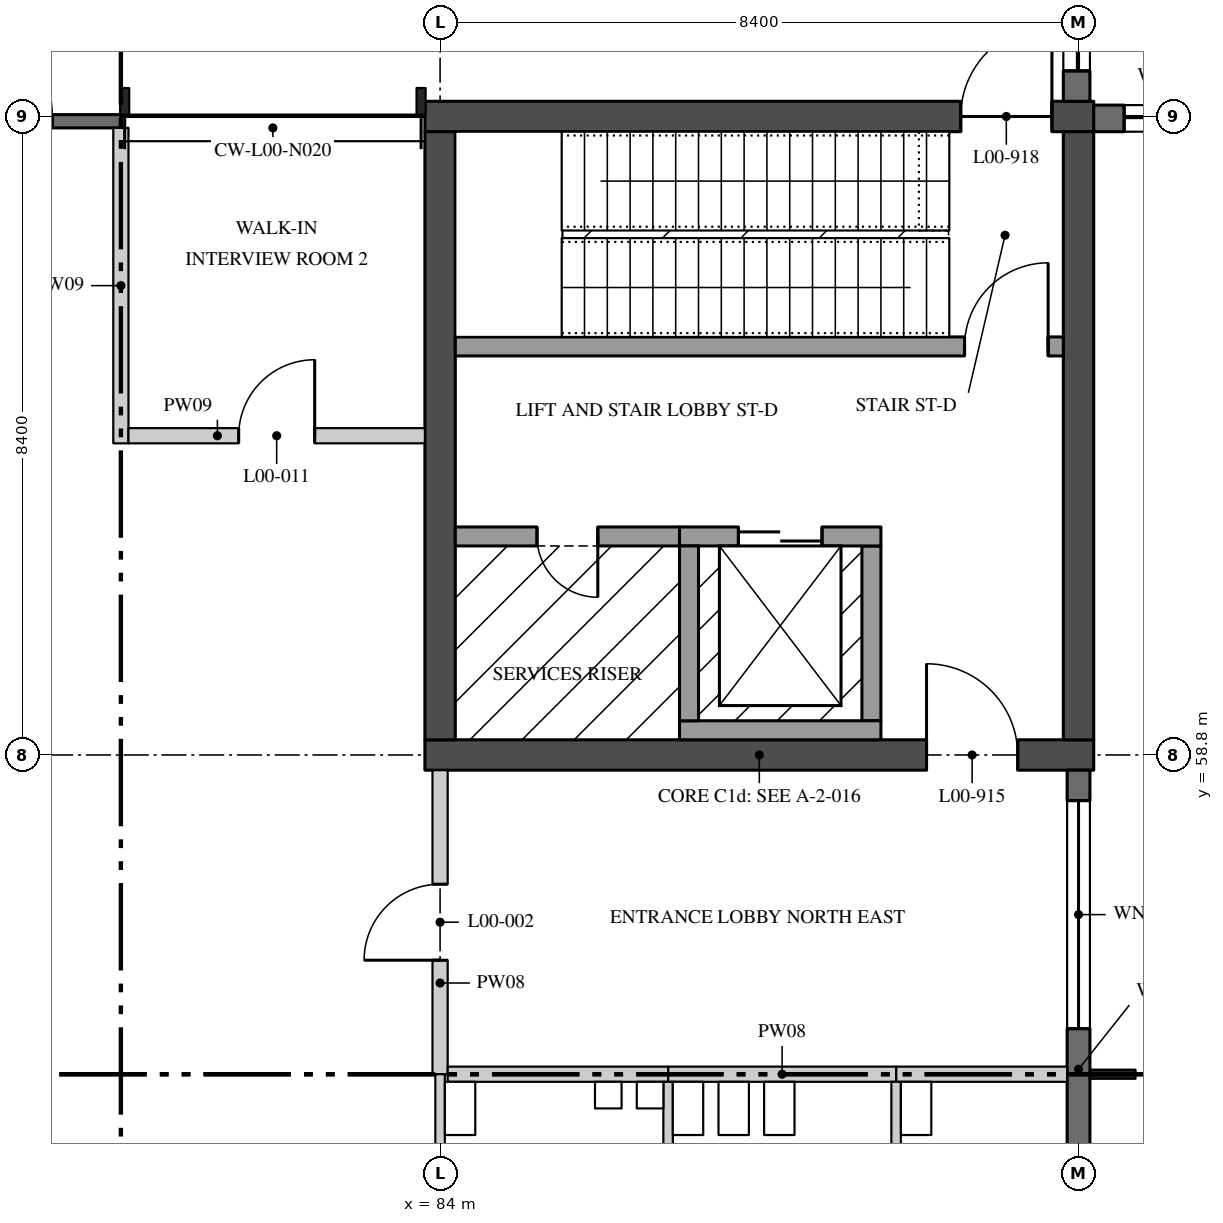
"""IFC4 building model, lengths in metres.
Left out: names, types, materials, properties, quantities, classifications, styles, units other than length and angle.
Written with IfcOpenShell. Run it as: python <this file> out.ifc"""

import sys

from ifc_helpers import new_model, si_unit, direction, frame, frame_2d, origin, place, context, subcontext, project, spatial, rectangle, extrude, element, fill, save


model = new_model("IFC4")
c1 = context("Model", 3, precision=1e-05, world=origin(), true_north=direction((0.0, 1.0)))
c2 = subcontext(c1, "Body", "Model", "MODEL_VIEW")
j1 = project(units=[si_unit("LENGTHUNIT", "METRE"), si_unit("PLANEANGLEUNIT", "RADIAN")], contexts=[c1])
p1 = place(None, origin())
s1 = spatial("IfcSite", under=j1, at=p1, CompositionType="ELEMENT")
p2 = place(p1, origin())
s2 = spatial("IfcBuilding", under=s1, at=p2, CompositionType="ELEMENT")
p3 = place(p2, origin())
s3 = spatial("IfcBuildingStorey", under=s2, at=p3, CompositionType="ELEMENT", Elevation=0.0)
p4 = place(p3, frame((83.8, 58.8, 0.0), z_axis=(0.0, 0.0, 1.0), x_axis=(1.0, 0.0, 0.0)))
e1 = element("IfcWall", 1, at=p4, inside=s3, PredefinedType="SHEAR", context=c2, shape_type="SweptSolid", body=[
    extrude(rectangle(XDim=8.8, YDim=0.4, at=frame_2d((4.4, 0.0))), origin(), (0.0, 0.0, 1.0), 5.05),
])
p5 = place(p4, frame((6.6, 0.0, 0.0)))
e2 = element("IfcOpeningElement", 2, at=p5, cuts=e1, PredefinedType="OPENING", context=c2, shape_type="SweptSolid", body=[
    extrude(rectangle(XDim=1.2, YDim=2.1, at=frame_2d((0.6, 1.05))), frame((0.0, 0.21, 0.0), z_axis=(0.0, -1.0, 0.0), x_axis=(1.0, 0.0, 0.0)), (0.0, 0.0, 1.0), 0.42),
])
p6 = place(p3, frame((83.8, 67.2, 0.0), z_axis=(0.0, 0.0, 1.0), x_axis=(1.0, 0.0, 0.0)))
e3 = element("IfcWall", 3, at=p6, inside=s3, PredefinedType="SHEAR", context=c2, shape_type="SweptSolid", body=[
    extrude(rectangle(XDim=8.8, YDim=0.4, at=frame_2d((4.4, 0.0))), origin(), (0.0, 0.0, 1.0), 5.05),
])
p7 = place(p6, frame((7.05, 0.0, 0.0)))
e4 = element("IfcOpeningElement", 4, at=p7, cuts=e3, PredefinedType="OPENING", context=c2, shape_type="SweptSolid", body=[
    extrude(rectangle(XDim=1.2, YDim=2.1, at=frame_2d((0.6, 1.05))), frame((0.0, 0.21, 0.0), z_axis=(0.0, -1.0, 0.0), x_axis=(1.0, 0.0, 0.0)), (0.0, 0.0, 1.0), 0.42),
])
for number, where, z_axis, x_axis in (
    (5, (84.0, 59.0, 0.0), (0.0, 0.0, 1.0), (0.0, 1.0, 0.0)),
    (6, (92.4, 59.0, 0.0), (0.0, 0.0, 1.0), (0.0, 1.0, 0.0)),
):
    element("IfcWall", number, at=place(p3, frame(where, z_axis=z_axis, x_axis=x_axis)), inside=s3, PredefinedType="SHEAR", context=c2, shape_type="SweptSolid", body=[
        extrude(rectangle(XDim=8.0, YDim=0.4, at=frame_2d((4.0, 0.0))), origin(), (0.0, 0.0, 1.0), 5.05),
    ])
p8 = place(p3, frame((92.2, 64.175, 0.0), z_axis=(0.0, 0.0, 1.0), x_axis=(-1.0, 0.0, 0.0)))
e7 = element("IfcWall", 7, at=p8, inside=s3, PredefinedType="SOLIDWALL", context=c2, shape_type="SweptSolid", body=[
    extrude(rectangle(XDim=8.0, YDim=0.25, at=frame_2d((4.0, 0.0))), origin(), (0.0, 0.0, 1.0), 5.05),
])
p9 = place(p8, frame((0.2, 0.0, 0.0)))
e8 = element("IfcOpeningElement", 8, at=p9, cuts=e7, PredefinedType="OPENING", context=c2, shape_type="SweptSolid", body=[
    extrude(rectangle(XDim=1.1, YDim=2.1, at=frame_2d((0.55, 1.05))), frame((0.0, 0.135, 0.0), z_axis=(0.0, -1.0, 0.0), x_axis=(1.0, 0.0, 0.0)), (0.0, 0.0, 1.0), 0.27),
])
p10 = place(p3, frame((87.15, 61.675, 0.0), z_axis=(0.0, 0.0, 1.0), x_axis=(-1.0, 0.0, 0.0)))
e9 = element("IfcWall", 9, at=p10, inside=s3, PredefinedType="SOLIDWALL", context=c2, shape_type="SweptSolid", body=[
    extrude(rectangle(XDim=2.95, YDim=0.25, at=frame_2d((1.475, 0.0))), origin(), (0.0, 0.0, 1.0), 5.05),
])
p11 = place(p10, frame((1.075, 0.0, 0.0)))
e10 = element("IfcOpeningElement", 10, at=p11, cuts=e9, PredefinedType="OPENING", context=c2, shape_type="SweptSolid", body=[
    extrude(rectangle(XDim=0.8, YDim=2.1, at=frame_2d((0.4, 1.05))), frame((0.0, 0.135, 0.0), z_axis=(0.0, -1.0, 0.0), x_axis=(1.0, 0.0, 0.0)), (0.0, 0.0, 1.0), 0.27),
])
p12 = place(p3, frame((89.675, 59.25, 0.0), z_axis=(0.0, 0.0, 1.0), x_axis=(0.0, 1.0, 0.0)))
e11 = element("IfcWall", 11, at=p12, inside=s3, PredefinedType="SOLIDWALL", context=c2, shape_type="SweptSolid", body=[
    extrude(rectangle(XDim=2.3, YDim=0.25, at=frame_2d((1.15, 0.0))), origin(), (0.0, 0.0, 1.0), 5.05),
])
p13 = place(p3, frame((87.15, 61.675, 0.0), z_axis=(0.0, 0.0, 1.0), x_axis=(1.0, 0.0, 0.0)))
e12 = element("IfcWall", 12, at=p13, inside=s3, PredefinedType="SOLIDWALL", context=c2, shape_type="SweptSolid", body=[
    extrude(rectangle(XDim=2.65, YDim=0.25, at=frame_2d((1.325, 0.0))), origin(), (0.0, 0.0, 1.0), 5.05),
])
p14 = place(p13, frame((0.775, 0.0, 0.0)))
e13 = element("IfcOpeningElement", 13, at=p14, cuts=e12, PredefinedType="OPENING", context=c2, shape_type="SweptSolid", body=[
    extrude(rectangle(XDim=1.1, YDim=2.1, at=frame_2d((0.55, 1.05))), frame((0.0, 0.135, 0.0), z_axis=(0.0, -1.0, 0.0), x_axis=(1.0, 0.0, 0.0)), (0.0, 0.0, 1.0), 0.27),
])
p15 = place(p3, frame((87.15, 59.125, 0.0), z_axis=(0.0, 0.0, 1.0), x_axis=(1.0, 0.0, 0.0)))
e14 = element("IfcWall", 14, at=p15, inside=s3, PredefinedType="SOLIDWALL", context=c2, shape_type="SweptSolid", body=[
    extrude(rectangle(XDim=2.65, YDim=0.25, at=frame_2d((1.325, 0.0))), origin(), (0.0, 0.0, 1.0), 5.05),
])
p16 = place(p3, frame((87.275, 59.25, 0.0), z_axis=(0.0, 0.0, 1.0), x_axis=(0.0, 1.0, 0.0)))
e15 = element("IfcWall", 15, at=p16, inside=s3, PredefinedType="SOLIDWALL", context=c2, shape_type="SweptSolid", body=[
    extrude(rectangle(XDim=2.3, YDim=0.25, at=frame_2d((1.15, 0.0))), origin(), (0.0, 0.0, 1.0), 5.05),
])
p17 = place(p3, frame((84.0, 54.6, 0.0), z_axis=(0.0, 0.0, 1.0), x_axis=(0.0, 1.0, 0.0)))
e16 = element("IfcWall", 16, at=p17, inside=s3, PredefinedType="PARTITIONING", context=c2, shape_type="SweptSolid", body=[
    extrude(rectangle(XDim=4.0, YDim=0.2, at=frame_2d((2.0, 0.0))), origin(), (0.0, 0.0, 1.0), 18.77),
])
p18 = place(p17, frame((1.5, 0.0, 0.0)))
e17 = element("IfcOpeningElement", 17, at=p18, cuts=e16, PredefinedType="OPENING", context=c2, shape_type="SweptSolid", body=[
    extrude(rectangle(XDim=1.0, YDim=2.4, at=frame_2d((0.5, 1.2))), frame((0.0, 0.11, 0.0), z_axis=(0.0, -1.0, 0.0), x_axis=(1.0, 0.0, 0.0)), (0.0, 0.0, 1.0), 0.22),
])
p19 = place(p3, frame((90.0, 54.6, 0.0), z_axis=(0.0, 0.0, 1.0), x_axis=(1.0, 0.0, 0.0)))
e18 = element("IfcWall", 18, at=p19, inside=s3, PredefinedType="PARTITIONING", context=c2, shape_type="SweptSolid", body=[
    extrude(rectangle(XDim=2.25, YDim=0.2, at=frame_2d((1.125, 0.0))), origin(), (0.0, 0.0, 1.0), 5.05),
])
p20 = place(p3, frame((87.0, 54.6, 0.0), z_axis=(0.0, 0.0, 1.0), x_axis=(1.0, 0.0, 0.0)))
e19 = element("IfcWall", 19, at=p20, inside=s3, PredefinedType="PARTITIONING", context=c2, shape_type="SweptSolid", body=[
    extrude(rectangle(XDim=3.0, YDim=0.2, at=frame_2d((1.5, 0.0))), origin(), (0.0, 0.0, 1.0), 5.05),
])
p21 = place(p3, frame((84.1, 54.6, 0.0), z_axis=(0.0, 0.0, 1.0), x_axis=(1.0, 0.0, 0.0)))
e20 = element("IfcWall", 20, at=p21, inside=s3, PredefinedType="PARTITIONING", context=c2, shape_type="SweptSolid", body=[
    extrude(rectangle(XDim=2.9, YDim=0.2, at=frame_2d((1.45, 0.0))), origin(), (0.0, 0.0, 1.0), 5.05),
])
p22 = place(p3, frame((84.0, 50.85, 0.0), z_axis=(0.0, 0.0, 1.0), x_axis=(0.0, 1.0, 0.0)))
e21 = element("IfcWall", 21, at=p22, inside=s3, PredefinedType="PARTITIONING", context=c2, shape_type="SweptSolid", body=[
    extrude(rectangle(XDim=3.75, YDim=0.125, at=frame_2d((1.875, 0.0))), origin(), (0.0, 0.0, 1.0), 18.77),
])
p23 = place(p3, frame((79.8, 62.9, 0.0), z_axis=(0.0, 0.0, 1.0), x_axis=(0.0, 1.0, 0.0)))
e22 = element("IfcWall", 22, at=p23, inside=s3, PredefinedType="PARTITIONING", context=c2, shape_type="SweptSolid", body=[
    extrude(rectangle(XDim=4.15, YDim=0.2, at=frame_2d((2.075, 0.0))), origin(), (0.0, 0.0, 1.0), 18.591),
])
p24 = place(p3, frame((79.9, 63.0, 0.0), z_axis=(0.0, 0.0, 1.0), x_axis=(1.0, 0.0, 0.0)))
e23 = element("IfcWall", 23, at=p24, inside=s3, PredefinedType="PARTITIONING", context=c2, shape_type="SweptSolid", body=[
    extrude(rectangle(XDim=3.9, YDim=0.2, at=frame_2d((1.95, 0.0))), origin(), (0.0, 0.0, 1.0), 18.77),
])
p25 = place(p24, frame((1.45, 0.0, 0.0)))
e24 = element("IfcOpeningElement", 24, at=p25, cuts=e23, PredefinedType="OPENING", context=c2, shape_type="SweptSolid", body=[
    extrude(rectangle(XDim=1.0, YDim=2.1, at=frame_2d((0.5, 1.05))), frame((0.0, 0.11, 0.0), z_axis=(0.0, -1.0, 0.0), x_axis=(1.0, 0.0, 0.0)), (0.0, 0.0, 1.0), 0.22),
])
for number, where, z_axis, x_axis in (
    (25, (90.0, 48.663, 0.0), (0.0, 0.0, 1.0), (0.0, 1.0, 0.0)),
    (26, (87.0, 48.663, 0.0), (0.0, 0.0, 1.0), (0.0, 1.0, 0.0)),
):
    element("IfcWall", number, at=place(p3, frame(where, z_axis=z_axis, x_axis=x_axis)), inside=s3, PredefinedType="PARTITIONING", context=c2, shape_type="SweptSolid", body=[
        extrude(rectangle(XDim=5.837, YDim=0.125, at=frame_2d((2.918, 0.0))), origin(), (0.0, 0.0, 1.0), 5.05),
    ])
p26 = place(p3, frame((92.375, 75.4, 0.0), z_axis=(0.0, 0.0, 1.0), x_axis=(0.0, -1.0, 0.0)))
e27 = element("IfcWall", 27, at=p26, inside=s3, PredefinedType="SOLIDWALL", context=c2, shape_type="SweptSolid", body=[
    extrude(rectangle(XDim=8.0, YDim=0.35, at=frame_2d((4.0, 0.0))), origin(), (0.0, 0.0, 1.0), 5.05),
])
p27 = place(p26, frame((6.7, 0.0, 1.5)))
e28 = element("IfcOpeningElement", 28, at=p27, cuts=e27, PredefinedType="OPENING", context=c2, shape_type="SweptSolid", body=[
    extrude(rectangle(XDim=0.9, YDim=1.2, at=frame_2d((0.45, 0.6))), frame((0.0, 0.185, 0.0), z_axis=(0.0, -1.0, 0.0), x_axis=(1.0, 0.0, 0.0)), (0.0, 0.0, 1.0), 0.37),
])
p28 = place(p3, frame((92.6, 67.175, 0.0), z_axis=(0.0, 0.0, 1.0), x_axis=(1.0, 0.0, 0.0)))
e29 = element("IfcWall", 29, at=p28, inside=s3, PredefinedType="SOLIDWALL", context=c2, shape_type="SweptSolid", body=[
    extrude(rectangle(XDim=7.77, YDim=0.35, at=frame_2d((3.885, 0.0))), origin(), (0.0, 0.0, 1.0), 5.05),
])
p29 = place(p28, frame((0.4, 0.0, 1.5)))
e30 = element("IfcOpeningElement", 30, at=p29, cuts=e29, PredefinedType="OPENING", context=c2, shape_type="SweptSolid", body=[
    extrude(rectangle(XDim=0.9, YDim=1.2, at=frame_2d((0.45, 0.6))), frame((0.0, 0.185, 0.0), z_axis=(0.0, -1.0, 0.0), x_axis=(1.0, 0.0, 0.0)), (0.0, 0.0, 1.0), 0.37),
])
p30 = place(p28, frame((2.5, 0.0, 1.5)))
e31 = element("IfcOpeningElement", 31, at=p30, cuts=e29, PredefinedType="OPENING", context=c2, shape_type="SweptSolid", body=[
    extrude(rectangle(XDim=0.9, YDim=1.2, at=frame_2d((0.45, 0.6))), frame((0.0, 0.185, 0.0), z_axis=(0.0, -1.0, 0.0), x_axis=(1.0, 0.0, 0.0)), (0.0, 0.0, 1.0), 0.37),
])
p31 = place(p28, frame((4.6, 0.0, 1.5)))
e32 = element("IfcOpeningElement", 32, at=p31, cuts=e29, PredefinedType="OPENING", context=c2, shape_type="SweptSolid", body=[
    extrude(rectangle(XDim=0.9, YDim=1.2, at=frame_2d((0.45, 0.6))), frame((0.0, 0.185, 0.0), z_axis=(0.0, -1.0, 0.0), x_axis=(1.0, 0.0, 0.0)), (0.0, 0.0, 1.0), 0.37),
])
p32 = place(p3, frame((79.8, 67.137, 0.0), z_axis=(0.0, 0.0, 1.0), x_axis=(-1.0, 0.0, 0.0)))
e33 = element("IfcWall", 33, at=p32, inside=s3, PredefinedType="SOLIDWALL", context=c2, shape_type="SweptSolid", body=[
    extrude(rectangle(XDim=3.87, YDim=0.175, at=frame_2d((1.935, 0.0))), origin(), (0.0, 0.0, 1.0), 5.4),
])
p33 = place(p32, frame((0.9, 0.0, 0.0)))
e34 = element("IfcOpeningElement", 34, at=p33, cuts=e33, PredefinedType="OPENING", context=c2, shape_type="SweptSolid", body=[
    extrude(rectangle(XDim=2.4, YDim=2.7, at=frame_2d((1.2, 1.35))), frame((0.0, 0.098, 0.0), z_axis=(0.0, -1.0, 0.0), x_axis=(1.0, 0.0, 0.0)), (0.0, 0.0, 1.0), 0.195),
])
p34 = place(p3, frame((92.4, 50.73, 0.0), z_axis=(0.0, 0.0, 1.0), x_axis=(0.0, 1.0, 0.0)))
e35 = element("IfcWall", 35, at=p34, inside=s3, PredefinedType="SOLIDWALL", context=c2, shape_type="SweptSolid", body=[
    extrude(rectangle(XDim=7.87, YDim=0.3, at=frame_2d((3.935, 0.0))), origin(), (0.0, 0.0, 1.0), 5.05),
])
p35 = place(p34, frame((1.32, 0.0, 1.5)))
e36 = element("IfcOpeningElement", 36, at=p35, cuts=e35, PredefinedType="OPENING", context=c2, shape_type="SweptSolid", body=[
    extrude(rectangle(XDim=0.9, YDim=1.2, at=frame_2d((0.45, 0.6))), frame((0.0, 0.16, 0.0), z_axis=(0.0, -1.0, 0.0), x_axis=(1.0, 0.0, 0.0)), (0.0, 0.0, 1.0), 0.32),
])
p36 = place(p34, frame((4.47, 0.0, 2.85)))
e37 = element("IfcOpeningElement", 37, at=p36, cuts=e35, PredefinedType="OPENING", context=c2, shape_type="SweptSolid", body=[
    extrude(rectangle(XDim=3.0, YDim=1.2, at=frame_2d((1.5, 0.6))), frame((0.0, 0.16, 0.0), z_axis=(0.0, -1.0, 0.0), x_axis=(1.0, 0.0, 0.0)), (0.0, 0.0, 1.0), 0.32),
])
p37 = place(p5, origin())
e38 = element("IfcDoor", 38, at=p37, inside=s3, OperationType="SINGLE_SWING_RIGHT", PredefinedType="DOOR", context=c2, shape_type="SweptSolid", body=[
    extrude(rectangle(XDim=1.2, YDim=2.1, at=frame_2d((0.6, 1.05))), frame((0.0, 0.035, 0.0), z_axis=(0.0, -1.0, 0.0), x_axis=(1.0, 0.0, 0.0)), (0.0, 0.0, 1.0), 0.07),
])
fill(e2, e38)
p38 = place(p11, origin())
e39 = element("IfcDoor", 39, at=p38, inside=s3, OperationType="SINGLE_SWING_RIGHT", PredefinedType="DOOR", context=c2, shape_type="SweptSolid", body=[
    extrude(rectangle(XDim=0.8, YDim=2.1, at=frame_2d((0.4, 1.05))), frame((0.0, 0.035, 0.0), z_axis=(0.0, -1.0, 0.0), x_axis=(1.0, 0.0, 0.0)), (0.0, 0.0, 1.0), 0.07),
])
fill(e10, e39)
p39 = place(p9, frame((1.1, 0.0, 0.0), z_axis=(0.0, 0.0, 1.0), x_axis=(-1.0, 0.0, 0.0)))
e40 = element("IfcDoor", 40, at=p39, inside=s3, OperationType="SINGLE_SWING_LEFT", PredefinedType="DOOR", context=c2, shape_type="SweptSolid", body=[
    extrude(rectangle(XDim=1.1, YDim=2.1, at=frame_2d((0.55, 1.05))), frame((0.0, 0.035, 0.0), z_axis=(0.0, -1.0, 0.0), x_axis=(1.0, 0.0, 0.0)), (0.0, 0.0, 1.0), 0.07),
])
fill(e8, e40)
p40 = place(p7, origin())
e41 = element("IfcDoor", 41, at=p40, inside=s3, OperationType="SINGLE_SWING_LEFT", PredefinedType="DOOR", context=c2, shape_type="SweptSolid", body=[
    extrude(rectangle(XDim=1.2, YDim=2.1, at=frame_2d((0.6, 1.05))), frame((0.0, 0.035, 0.0), z_axis=(0.0, -1.0, 0.0), x_axis=(1.0, 0.0, 0.0)), (0.0, 0.0, 1.0), 0.07),
])
fill(e4, e41)
p41 = place(p14, origin())
e42 = element("IfcDoor", 42, at=p41, inside=s3, OperationType="DOUBLE_DOOR_SLIDING", PredefinedType="DOOR", context=c2, shape_type="SweptSolid", body=[
    extrude(rectangle(XDim=1.1, YDim=2.1, at=frame_2d((0.55, 1.05))), frame((0.0, 0.04, 0.0), z_axis=(0.0, -1.0, 0.0), x_axis=(1.0, 0.0, 0.0)), (0.0, 0.0, 1.0), 0.08),
])
fill(e13, e42)
p42 = place(p18, origin())
e43 = element("IfcDoor", 43, at=p42, inside=s3, OperationType="SINGLE_SWING_RIGHT", PredefinedType="DOOR", context=c2, shape_type="SweptSolid", body=[
    extrude(rectangle(XDim=1.0, YDim=2.4, at=frame_2d((0.5, 1.2))), frame((0.0, 0.03, 0.0), z_axis=(0.0, -1.0, 0.0), x_axis=(1.0, 0.0, 0.0)), (0.0, 0.0, 1.0), 0.06),
])
fill(e17, e43)
p43 = place(p25, origin())
e44 = element("IfcDoor", 44, at=p43, inside=s3, OperationType="SINGLE_SWING_LEFT", PredefinedType="DOOR", context=c2, shape_type="SweptSolid", body=[
    extrude(rectangle(XDim=1.0, YDim=2.1, at=frame_2d((0.5, 1.05))), frame((0.0, 0.045, 0.0), z_axis=(0.0, -1.0, 0.0), x_axis=(1.0, 0.0, 0.0)), (0.0, 0.0, 1.0), 0.09),
])
fill(e24, e44)
p44 = place(p27, origin())
e45 = element("IfcWindow", 45, at=p44, inside=s3, PartitioningType="SINGLE_PANEL", PredefinedType="WINDOW", context=c2, shape_type="SweptSolid", body=[
    extrude(rectangle(XDim=0.9, YDim=1.2, at=frame_2d((0.45, 0.6))), frame((0.0, 0.05, 0.0), z_axis=(0.0, -1.0, 0.0), x_axis=(1.0, 0.0, 0.0)), (0.0, 0.0, 1.0), 0.1),
])
fill(e28, e45)
p45 = place(p29, origin())
e46 = element("IfcWindow", 46, at=p45, inside=s3, PartitioningType="SINGLE_PANEL", PredefinedType="WINDOW", context=c2, shape_type="SweptSolid", body=[
    extrude(rectangle(XDim=0.9, YDim=1.2, at=frame_2d((0.45, 0.6))), frame((0.0, 0.05, 0.0), z_axis=(0.0, -1.0, 0.0), x_axis=(1.0, 0.0, 0.0)), (0.0, 0.0, 1.0), 0.1),
])
fill(e30, e46)
p46 = place(p33, frame((2.4, 0.0, 0.0), z_axis=(0.0, 0.0, 1.0), x_axis=(-1.0, 0.0, 0.0)))
e47 = element("IfcDoor", 47, at=p46, inside=s3, OperationType="SINGLE_SWING_RIGHT", PredefinedType="DOOR", context=c2, shape_type="SweptSolid", body=[
    extrude(rectangle(XDim=2.4, YDim=2.7, at=frame_2d((1.2, 1.35))), frame((0.0, 0.025, 0.0), z_axis=(0.0, -1.0, 0.0), x_axis=(1.0, 0.0, 0.0)), (0.0, 0.0, 1.0), 0.05),
])
fill(e34, e47)
p47 = place(p36, origin())
e48 = element("IfcWindow", 48, at=p47, inside=s3, PartitioningType="SINGLE_PANEL", PredefinedType="WINDOW", context=c2, shape_type="SweptSolid", body=[
    extrude(rectangle(XDim=3.0, YDim=1.2, at=frame_2d((1.5, 0.6))), frame((0.0, 0.05, 0.0), z_axis=(0.0, -1.0, 0.0), x_axis=(1.0, 0.0, 0.0)), (0.0, 0.0, 1.0), 0.1),
])
fill(e37, e48)
save(model, sys.argv[1])
